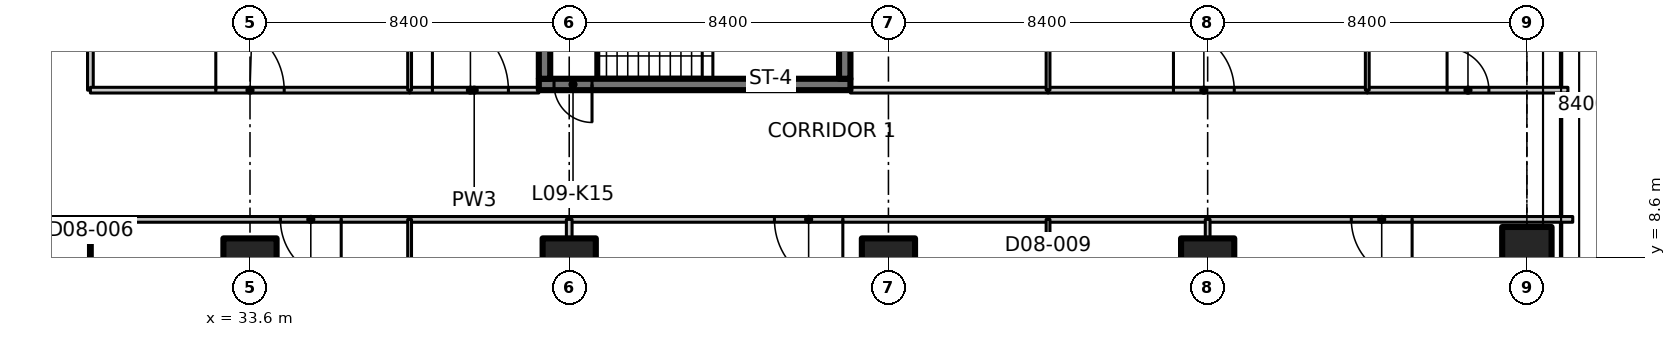
"""IFC4 building model, lengths in metres.
Left out: names, types, materials, properties, quantities, classifications, styles, units other than length and angle.
Written with IfcOpenShell. Run it as: python <this file> out.ifc"""

import sys

from ifc_helpers import new_model, si_unit, direction, frame, frame_2d, origin, origin_2d, place, context, subcontext, project, spatial, polyline, rectangle, outline, extrude, element, fill, save


model = new_model("IFC4")
c1 = context("Model", 3, precision=1e-05, world=origin(), true_north=direction((0.0, 1.0)))
c2 = subcontext(c1, "Body", "Model", "MODEL_VIEW")
j1 = project(units=[si_unit("LENGTHUNIT", "METRE"), si_unit("PLANEANGLEUNIT", "RADIAN")], contexts=[c1])
p1 = place(None, origin())
s1 = spatial("IfcSite", under=j1, at=p1, CompositionType="ELEMENT")
p2 = place(p1, origin())
s2 = spatial("IfcBuilding", under=s1, at=p2, CompositionType="ELEMENT")
p3 = place(p2, frame((0.0, 0.0, 47.3)))
s3 = spatial("IfcBuildingStorey", under=s2, at=p3, CompositionType="ELEMENT", Elevation=47.3)
for number, where, z_axis, x_axis in (
    (1, (33.6, 8.4, 0.0), (0.0, 0.0, 1.0), (1.0, 0.0, 0.0)),
    (2, (42.0, 8.4, 0.0), (0.0, 0.0, 1.0), (1.0, 0.0, 0.0)),
    (3, (50.4, 8.4, 0.0), (0.0, 0.0, 1.0), (1.0, 0.0, 0.0)),
    (4, (58.8, 8.4, 0.0), (0.0, 0.0, 1.0), (1.0, 0.0, 0.0)),
):
    element("IfcColumn", number, at=place(p3, frame(where, z_axis=z_axis, x_axis=x_axis)), inside=s3, PredefinedType="COLUMN", context=c2, shape_type="SweptSolid", body=[
        extrude(rectangle(XDim=1.4, YDim=1.4, at=origin_2d()), origin(), (0.0, 0.0, 1.0), 3.35),
    ])
p4 = place(p3, frame((67.2, 8.4, 0.0), z_axis=(0.0, 0.0, 1.0), x_axis=(1.0, 0.0, 0.0)))
e5 = element("IfcColumn", 5, at=p4, inside=s3, PredefinedType="COLUMN", context=c2, shape_type="SweptSolid", body=[
    extrude(rectangle(XDim=1.3, YDim=2.0, at=origin_2d()), origin(), (0.0, 0.0, 1.0), 3.35),
])
p5 = place(p3, frame((49.4, 13.15, 0.0), z_axis=(0.0, 0.0, 1.0), x_axis=(-1.0, 0.0, 0.0)))
e6 = element("IfcWall", 6, at=p5, inside=s3, PredefinedType="SHEAR", context=c2, shape_type="SweptSolid", body=[
    extrude(rectangle(XDim=8.2, YDim=0.3, at=frame_2d((4.1, 0.0))), origin(), (0.0, 0.0, 1.0), 3.35),
])
p6 = place(p5, frame((6.8, 0.0, 0.0)))
e7 = element("IfcOpeningElement", 7, at=p6, cuts=e6, PredefinedType="OPENING", context=c2, shape_type="SweptSolid", body=[
    extrude(rectangle(XDim=1.0, YDim=2.1, at=frame_2d((0.5, 1.05))), frame((0.0, 0.16, 0.0), z_axis=(0.0, -1.0, 0.0), x_axis=(1.0, 0.0, 0.0)), (0.0, 0.0, 1.0), 0.32),
])
for number, where, z_axis, x_axis in (
    (8, (41.35, 13.3, 0.0), (0.0, 0.0, 1.0), (0.0, 1.0, 0.0)),
    (9, (49.25, 13.3, 0.0), (0.0, 0.0, 1.0), (0.0, 1.0, 0.0)),
):
    element("IfcWall", number, at=place(p3, frame(where, z_axis=z_axis, x_axis=x_axis)), inside=s3, PredefinedType="SHEAR", context=c2, shape_type="SweptSolid", body=[
        extrude(rectangle(XDim=2.55, YDim=0.3, at=frame_2d((1.275, 0.0))), origin(), (0.0, 0.0, 1.0), 3.35),
    ])
p7 = place(p3, frame((29.4, 9.6, 0.0), z_axis=(0.0, 0.0, 1.0), x_axis=(-1.0, 0.0, 0.0)))
e10 = element("IfcWall", 10, at=p7, inside=s3, PredefinedType="PARTITIONING", context=c2, shape_type="SweptSolid", body=[
    extrude(rectangle(XDim=4.2, YDim=0.15, at=frame_2d((2.1, 0.0))), origin(), (0.0, 0.0, 1.0), 3.33),
])
p8 = place(p3, frame((29.4, 21.2, 0.0), z_axis=(0.0, 0.0, 1.0), x_axis=(0.0, -1.0, 0.0)))
e11 = element("IfcWall", 11, at=p8, inside=s3, PredefinedType="PARTITIONING", context=c2, shape_type="SweptSolid", body=[
    extrude(rectangle(XDim=8.2, YDim=0.15, at=frame_2d((4.1, 0.0))), origin(), (0.0, 0.0, 1.0), 3.33),
])
p9 = place(p3, frame((37.8, 9.6, 0.0), z_axis=(0.0, 0.0, 1.0), x_axis=(-1.0, 0.0, 0.0)))
e12 = element("IfcWall", 12, at=p9, inside=s3, PredefinedType="PARTITIONING", context=c2, shape_type="SweptSolid", body=[
    extrude(rectangle(XDim=8.4, YDim=0.15, at=frame_2d((4.2, 0.0))), origin(), (0.0, 0.0, 1.0), 3.33),
])
p10 = place(p9, frame((1.8, 0.0, 0.0)))
e13 = element("IfcOpeningElement", 13, at=p10, cuts=e12, PredefinedType="OPENING", context=c2, shape_type="SweptSolid", body=[
    extrude(rectangle(XDim=1.6, YDim=2.1, at=frame_2d((0.8, 1.05))), frame((0.0, 0.085, 0.0), z_axis=(0.0, -1.0, 0.0), x_axis=(1.0, 0.0, 0.0)), (0.0, 0.0, 1.0), 0.17),
])
p11 = place(p3, frame((42.0, 9.6, 0.0), z_axis=(0.0, 0.0, 1.0), x_axis=(-1.0, 0.0, 0.0)))
e14 = element("IfcWall", 14, at=p11, inside=s3, PredefinedType="PARTITIONING", context=c2, shape_type="SweptSolid", body=[
    extrude(rectangle(XDim=4.2, YDim=0.15, at=frame_2d((2.1, 0.0))), origin(), (0.0, 0.0, 1.0), 3.33),
])
p12 = place(p3, frame((54.6, 9.6, 0.0), z_axis=(0.0, 0.0, 1.0), x_axis=(-1.0, 0.0, 0.0)))
e15 = element("IfcWall", 15, at=p12, inside=s3, PredefinedType="PARTITIONING", context=c2, shape_type="SweptSolid", body=[
    extrude(rectangle(XDim=12.6, YDim=0.15, at=frame_2d((6.3, 0.0))), origin(), (0.0, 0.0, 1.0), 3.33),
])
p13 = place(p12, frame((5.4, 0.0, 0.0)))
e16 = element("IfcOpeningElement", 16, at=p13, cuts=e15, PredefinedType="OPENING", context=c2, shape_type="SweptSolid", body=[
    extrude(rectangle(XDim=1.8, YDim=2.1, at=frame_2d((0.9, 1.05))), frame((0.0, 0.085, 0.0), z_axis=(0.0, -1.0, 0.0), x_axis=(1.0, 0.0, 0.0)), (0.0, 0.0, 1.0), 0.17),
])
p14 = place(p3, frame((58.8, 9.6, 0.0), z_axis=(0.0, 0.0, 1.0), x_axis=(-1.0, 0.0, 0.0)))
e17 = element("IfcWall", 17, at=p14, inside=s3, PredefinedType="PARTITIONING", context=c2, shape_type="SweptSolid", body=[
    extrude(rectangle(XDim=4.2, YDim=0.15, at=frame_2d((2.1, 0.0))), origin(), (0.0, 0.0, 1.0), 3.33),
])
p15 = place(p3, frame((68.407, 9.6, 0.0), z_axis=(0.0, 0.0, 1.0), x_axis=(-1.0, 0.0, 0.0)))
e18 = element("IfcWall", 18, at=p15, inside=s3, PredefinedType="PARTITIONING", context=c2, shape_type="SweptSolid", body=[
    extrude(outline(polyline([(0.0, 0.0), (9.607, 0.0), (9.607, 3.33), (1.657, 3.33), (1.655, 2.98), (0.759, 2.98), (0.757, 3.33), (0.127, 3.33), (0.0, 3.33), (0.0, 0.0)])), frame((0.0, 0.075, 0.0), z_axis=(0.0, -1.0, 0.0), x_axis=(1.0, 0.0, 0.0)), (0.0, 0.0, 1.0), 0.15),
])
p16 = place(p15, frame((4.227, 0.0, 0.0)))
e19 = element("IfcOpeningElement", 19, at=p16, cuts=e18, PredefinedType="OPENING", context=c2, shape_type="SweptSolid", body=[
    extrude(rectangle(XDim=1.6, YDim=2.1, at=frame_2d((0.8, 1.05))), frame((0.0, 0.085, 0.0), z_axis=(0.0, -1.0, 0.0), x_axis=(1.0, 0.0, 0.0)), (0.0, 0.0, 1.0), 0.17),
])
p17 = place(p3, frame((29.4, 13.0, 0.0), z_axis=(0.0, 0.0, 1.0), x_axis=(1.0, 0.0, 0.0)))
e20 = element("IfcWall", 20, at=p17, inside=s3, PredefinedType="PARTITIONING", context=c2, shape_type="SweptSolid", body=[
    extrude(rectangle(XDim=8.4, YDim=0.15, at=frame_2d((4.2, 0.0))), origin(), (0.0, 0.0, 1.0), 3.33),
])
p18 = place(p17, frame((3.3, 0.0, 0.0)))
e21 = element("IfcOpeningElement", 21, at=p18, cuts=e20, PredefinedType="OPENING", context=c2, shape_type="SweptSolid", body=[
    extrude(rectangle(XDim=1.8, YDim=2.1, at=frame_2d((0.9, 1.05))), frame((0.0, 0.085, 0.0), z_axis=(0.0, -1.0, 0.0), x_axis=(1.0, 0.0, 0.0)), (0.0, 0.0, 1.0), 0.17),
])
p19 = place(p3, frame((37.8, 13.0, 0.0), z_axis=(0.0, 0.0, 1.0), x_axis=(1.0, 0.0, 0.0)))
e22 = element("IfcWall", 22, at=p19, inside=s3, PredefinedType="PARTITIONING", context=c2, shape_type="SweptSolid", body=[
    extrude(rectangle(XDim=3.4, YDim=0.15, at=frame_2d((1.7, 0.0))), origin(), (0.0, 0.0, 1.0), 3.33),
])
p20 = place(p19, frame((0.6, 0.0, 0.0)))
e23 = element("IfcOpeningElement", 23, at=p20, cuts=e22, PredefinedType="OPENING", context=c2, shape_type="SweptSolid", body=[
    extrude(rectangle(XDim=2.0, YDim=2.4, at=frame_2d((1.0, 1.2))), frame((0.0, 0.085, 0.0), z_axis=(0.0, -1.0, 0.0), x_axis=(1.0, 0.0, 0.0)), (0.0, 0.0, 1.0), 0.17),
])
p21 = place(p3, frame((49.4, 13.0, 0.0), z_axis=(0.0, 0.0, 1.0), x_axis=(1.0, 0.0, 0.0)))
e24 = element("IfcWall", 24, at=p21, inside=s3, PredefinedType="PARTITIONING", context=c2, shape_type="SweptSolid", body=[
    extrude(rectangle(XDim=5.2, YDim=0.15, at=frame_2d((2.6, 0.0))), origin(), (0.0, 0.0, 1.0), 3.33),
])
p22 = place(p3, frame((54.6, 13.0, 0.0), z_axis=(0.0, 0.0, 1.0), x_axis=(1.0, 0.0, 0.0)))
e25 = element("IfcWall", 25, at=p22, inside=s3, PredefinedType="PARTITIONING", context=c2, shape_type="SweptSolid", body=[
    extrude(rectangle(XDim=8.4, YDim=0.15, at=frame_2d((4.2, 0.0))), origin(), (0.0, 0.0, 1.0), 3.33),
])
p23 = place(p22, frame((3.3, 0.0, 0.0)))
e26 = element("IfcOpeningElement", 26, at=p23, cuts=e25, PredefinedType="OPENING", context=c2, shape_type="SweptSolid", body=[
    extrude(rectangle(XDim=1.6, YDim=2.1, at=frame_2d((0.8, 1.05))), frame((0.0, 0.085, 0.0), z_axis=(0.0, -1.0, 0.0), x_axis=(1.0, 0.0, 0.0)), (0.0, 0.0, 1.0), 0.17),
])
p24 = place(p3, frame((63.0, 13.0, 0.0), z_axis=(0.0, 0.0, 1.0), x_axis=(1.0, 0.0, 0.0)))
e27 = element("IfcWall", 27, at=p24, inside=s3, PredefinedType="PARTITIONING", context=c2, shape_type="SweptSolid", body=[
    extrude(outline(polyline([(0.0, 0.0), (5.28, 0.0), (5.28, 3.33), (4.65, 3.33), (4.648, 2.98), (3.752, 2.98), (3.75, 3.33), (0.0, 3.33), (0.0, 0.0)])), frame((0.0, 0.075, 0.0), z_axis=(0.0, -1.0, 0.0), x_axis=(1.0, 0.0, 0.0)), (0.0, 0.0, 1.0), 0.15),
])
p25 = place(p24, frame((2.1, 0.0, 0.0)))
e28 = element("IfcOpeningElement", 28, at=p25, cuts=e27, PredefinedType="OPENING", context=c2, shape_type="SweptSolid", body=[
    extrude(rectangle(XDim=1.1, YDim=2.1, at=frame_2d((0.55, 1.05))), frame((0.0, 0.085, 0.0), z_axis=(0.0, -1.0, 0.0), x_axis=(1.0, 0.0, 0.0)), (0.0, 0.0, 1.0), 0.17),
])
p26 = place(p3, frame((37.8, 9.6, 0.0), z_axis=(0.0, 0.0, 1.0), x_axis=(0.0, -1.0, 0.0)))
e29 = element("IfcWall", 29, at=p26, inside=s3, PredefinedType="PARTITIONING", context=c2, shape_type="SweptSolid", body=[
    extrude(rectangle(XDim=5.4, YDim=0.1, at=frame_2d((2.7, 0.0))), origin(), (0.0, 0.0, 1.0), 3.33),
])
p27 = place(p26, frame((2.1, 0.0, 0.0)))
e30 = element("IfcOpeningElement", 30, at=p27, cuts=e29, PredefinedType="OPENING", context=c2, shape_type="SweptSolid", body=[
    extrude(rectangle(XDim=1.0, YDim=2.1, at=frame_2d((0.5, 1.05))), frame((0.0, 0.06, 0.0), z_axis=(0.0, -1.0, 0.0), x_axis=(1.0, 0.0, 0.0)), (0.0, 0.0, 1.0), 0.12),
])
p28 = place(p3, frame((29.4, 4.8, 0.0), z_axis=(0.0, 0.0, 1.0), x_axis=(0.0, 1.0, 0.0)))
e31 = element("IfcWall", 31, at=p28, inside=s3, PredefinedType="PARTITIONING", context=c2, shape_type="SweptSolid", body=[
    extrude(rectangle(XDim=4.8, YDim=0.1, at=frame_2d((2.4, 0.0))), origin(), (0.0, 0.0, 1.0), 3.33),
])
p29 = place(p28, frame((1.8, 0.0, 0.0)))
e32 = element("IfcOpeningElement", 32, at=p29, cuts=e31, PredefinedType="OPENING", context=c2, shape_type="SweptSolid", body=[
    extrude(rectangle(XDim=1.0, YDim=2.1, at=frame_2d((0.5, 1.05))), frame((0.0, 0.06, 0.0), z_axis=(0.0, -1.0, 0.0), x_axis=(1.0, 0.0, 0.0)), (0.0, 0.0, 1.0), 0.12),
])
p30 = place(p3, frame((42.0, 9.6, 0.0), z_axis=(0.0, 0.0, 1.0), x_axis=(0.0, -1.0, 0.0)))
e33 = element("IfcWall", 33, at=p30, inside=s3, PredefinedType="PARTITIONING", context=c2, shape_type="SweptSolid", body=[
    extrude(rectangle(XDim=0.48, YDim=0.15, at=frame_2d((0.24, 0.0))), origin(), (0.0, 0.0, 1.0), 3.33),
])
p31 = place(p3, frame((54.6, 9.6, 0.0), z_axis=(0.0, 0.0, 1.0), x_axis=(0.0, -1.0, 0.0)))
e34 = element("IfcWall", 34, at=p31, inside=s3, PredefinedType="PARTITIONING", context=c2, shape_type="SweptSolid", body=[
    extrude(rectangle(XDim=6.0, YDim=0.1, at=frame_2d((3.0, 0.0))), origin(), (0.0, 0.0, 1.0), 3.33),
])
p32 = place(p31, frame((2.4, 0.0, 0.0)))
e35 = element("IfcOpeningElement", 35, at=p32, cuts=e34, PredefinedType="OPENING", context=c2, shape_type="SweptSolid", body=[
    extrude(rectangle(XDim=1.0, YDim=2.1, at=frame_2d((0.5, 1.05))), frame((0.0, 0.06, 0.0), z_axis=(0.0, -1.0, 0.0), x_axis=(1.0, 0.0, 0.0)), (0.0, 0.0, 1.0), 0.12),
])
p33 = place(p3, frame((58.8, 9.6, 0.0), z_axis=(0.0, 0.0, 1.0), x_axis=(0.0, -1.0, 0.0)))
e36 = element("IfcWall", 36, at=p33, inside=s3, PredefinedType="PARTITIONING", context=c2, shape_type="SweptSolid", body=[
    extrude(rectangle(XDim=0.48, YDim=0.125, at=frame_2d((0.24, 0.0))), origin(), (0.0, 0.0, 1.0), 3.33),
])
p34 = place(p3, frame((37.8, 30.526, 0.0), z_axis=(0.0, 0.0, 1.0), x_axis=(0.0, -1.0, 0.0)))
e37 = element("IfcWall", 37, at=p34, inside=s3, PredefinedType="PARTITIONING", context=c2, shape_type="SweptSolid", body=[
    extrude(outline(polyline([(0.0, 0.0), (17.526, 0.0), (17.526, 3.33), (5.776, 3.33), (5.774, 2.98), (4.878, 2.98), (4.876, 3.33), (0.283, 3.33), (0.0, 3.33), (0.0, 0.0)])), frame((0.0, 0.05, 0.0), z_axis=(0.0, -1.0, 0.0), x_axis=(1.0, 0.0, 0.0)), (0.0, 0.0, 1.0), 0.1),
])
p35 = place(p3, frame((54.6, 26.565, 0.0), z_axis=(0.0, 0.0, 1.0), x_axis=(0.0, -1.0, 0.0)))
e38 = element("IfcWall", 38, at=p35, inside=s3, PredefinedType="PARTITIONING", context=c2, shape_type="SweptSolid", body=[
    extrude(outline(polyline([(0.0, 0.0), (13.565, 0.0), (13.565, 3.33), (1.815, 3.33), (1.813, 2.98), (0.917, 2.98), (0.915, 3.33), (0.265, 3.33), (0.0, 3.33), (0.0, 0.0)])), frame((0.0, 0.05, 0.0), z_axis=(0.0, -1.0, 0.0), x_axis=(1.0, 0.0, 0.0)), (0.0, 0.0, 1.0), 0.1),
])
p36 = place(p3, frame((63.0, 25.4, 0.0), z_axis=(0.0, 0.0, 1.0), x_axis=(0.0, -1.0, 0.0)))
e39 = element("IfcWall", 39, at=p36, inside=s3, PredefinedType="PARTITIONING", context=c2, shape_type="SweptSolid", body=[
    extrude(outline(polyline([(0.0, 0.0), (12.4, 0.0), (12.4, 3.33), (5.066, 3.33), (5.064, 2.98), (3.736, 2.98), (3.734, 3.33), (0.0, 3.33), (0.0, 0.0)])), frame((0.0, 0.05, 0.0), z_axis=(0.0, -1.0, 0.0), x_axis=(1.0, 0.0, 0.0)), (0.0, 0.0, 1.0), 0.1),
])
p37 = place(p6, origin())
e40 = element("IfcDoor", 40, at=p37, inside=s3, OperationType="SINGLE_SWING_RIGHT", PredefinedType="DOOR", context=c2, shape_type="SweptSolid", body=[
    extrude(rectangle(XDim=1.0, YDim=2.1, at=frame_2d((0.5, 1.05))), frame((0.0, 0.025, 0.0), z_axis=(0.0, -1.0, 0.0), x_axis=(1.0, 0.0, 0.0)), (0.0, 0.0, 1.0), 0.05),
])
fill(e7, e40)
p38 = place(p10, origin())
e41 = element("IfcDoor", 41, at=p38, inside=s3, OperationType="DOUBLE_DOOR_SINGLE_SWING", PredefinedType="DOOR", context=c2, shape_type="SweptSolid", body=[
    extrude(rectangle(XDim=1.6, YDim=2.1, at=frame_2d((0.8, 1.05))), frame((0.0, 0.025, 0.0), z_axis=(0.0, -1.0, 0.0), x_axis=(1.0, 0.0, 0.0)), (0.0, 0.0, 1.0), 0.05),
])
fill(e13, e41)
p39 = place(p13, origin())
e42 = element("IfcDoor", 42, at=p39, inside=s3, OperationType="DOUBLE_DOOR_SINGLE_SWING", PredefinedType="DOOR", context=c2, shape_type="SweptSolid", body=[
    extrude(rectangle(XDim=1.8, YDim=2.1, at=frame_2d((0.9, 1.05))), frame((0.0, 0.025, 0.0), z_axis=(0.0, -1.0, 0.0), x_axis=(1.0, 0.0, 0.0)), (0.0, 0.0, 1.0), 0.05),
])
fill(e16, e42)
p40 = place(p16, origin())
e43 = element("IfcDoor", 43, at=p40, inside=s3, OperationType="DOUBLE_DOOR_SINGLE_SWING", PredefinedType="DOOR", context=c2, shape_type="SweptSolid", body=[
    extrude(rectangle(XDim=1.6, YDim=2.1, at=frame_2d((0.8, 1.05))), frame((0.0, 0.025, 0.0), z_axis=(0.0, -1.0, 0.0), x_axis=(1.0, 0.0, 0.0)), (0.0, 0.0, 1.0), 0.05),
])
fill(e19, e43)
p41 = place(p18, origin())
e44 = element("IfcDoor", 44, at=p41, inside=s3, OperationType="DOUBLE_DOOR_SINGLE_SWING", PredefinedType="DOOR", context=c2, shape_type="SweptSolid", body=[
    extrude(rectangle(XDim=1.8, YDim=2.1, at=frame_2d((0.9, 1.05))), frame((0.0, 0.025, 0.0), z_axis=(0.0, -1.0, 0.0), x_axis=(1.0, 0.0, 0.0)), (0.0, 0.0, 1.0), 0.05),
])
fill(e21, e44)
p42 = place(p20, origin())
e45 = element("IfcDoor", 45, at=p42, inside=s3, OperationType="DOUBLE_DOOR_SINGLE_SWING", PredefinedType="DOOR", context=c2, shape_type="SweptSolid", body=[
    extrude(rectangle(XDim=2.0, YDim=2.4, at=frame_2d((1.0, 1.2))), frame((0.0, 0.025, 0.0), z_axis=(0.0, -1.0, 0.0), x_axis=(1.0, 0.0, 0.0)), (0.0, 0.0, 1.0), 0.05),
])
fill(e23, e45)
p43 = place(p23, origin())
e46 = element("IfcDoor", 46, at=p43, inside=s3, OperationType="DOUBLE_DOOR_SINGLE_SWING", PredefinedType="DOOR", context=c2, shape_type="SweptSolid", body=[
    extrude(rectangle(XDim=1.6, YDim=2.1, at=frame_2d((0.8, 1.05))), frame((0.0, 0.025, 0.0), z_axis=(0.0, -1.0, 0.0), x_axis=(1.0, 0.0, 0.0)), (0.0, 0.0, 1.0), 0.05),
])
fill(e26, e46)
p44 = place(p25, origin())
e47 = element("IfcDoor", 47, at=p44, inside=s3, OperationType="SINGLE_SWING_LEFT", PredefinedType="DOOR", context=c2, shape_type="SweptSolid", body=[
    extrude(rectangle(XDim=1.1, YDim=2.1, at=frame_2d((0.55, 1.05))), frame((0.0, 0.025, 0.0), z_axis=(0.0, -1.0, 0.0), x_axis=(1.0, 0.0, 0.0)), (0.0, 0.0, 1.0), 0.05),
])
fill(e28, e47)
save(model, sys.argv[1])
